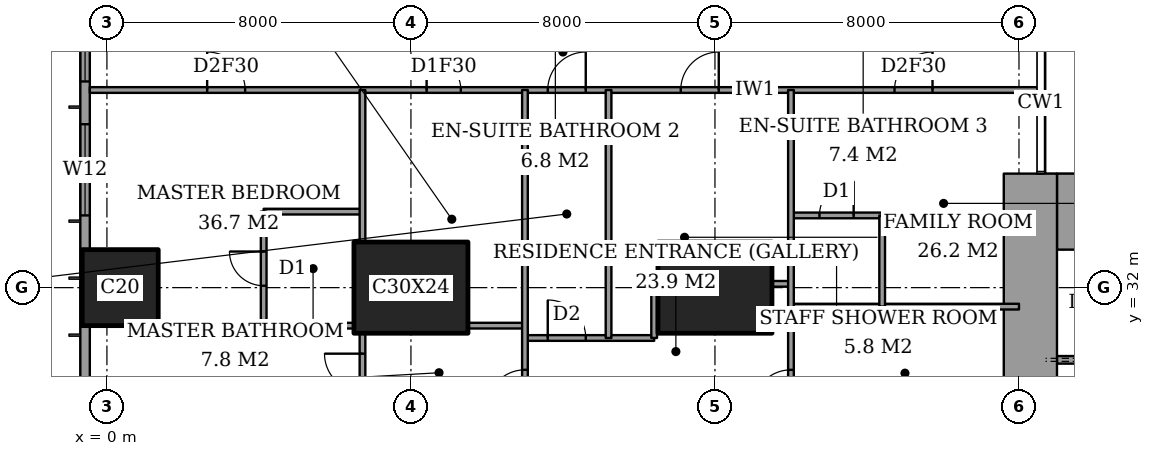
"""IFC4 building model, lengths in metres.
Left out: names, types, materials, properties, quantities, classifications, styles, units other than length and angle.
Written with IfcOpenShell. Run it as: python <this file> out.ifc"""

import sys

from ifc_helpers import new_model, si_unit, direction, frame, frame_2d, origin, origin_2d, place, context, subcontext, project, spatial, rectangle, extrude, element, fill, save


model = new_model("IFC4")
c1 = context("Model", 3, precision=1e-05, world=origin(), true_north=direction((0.0, 1.0)))
c2 = subcontext(c1, "Body", "Model", "MODEL_VIEW")
j1 = project(units=[si_unit("LENGTHUNIT", "METRE"), si_unit("PLANEANGLEUNIT", "RADIAN")], contexts=[c1])
p1 = place(None, origin())
s1 = spatial("IfcSite", under=j1, at=p1, CompositionType="ELEMENT")
p2 = place(p1, origin())
s2 = spatial("IfcBuilding", under=s1, at=p2, CompositionType="ELEMENT")
p3 = place(p2, frame((0.0, 0.0, 107.0)))
s3 = spatial("IfcBuildingStorey", under=s2, at=p3, CompositionType="ELEMENT", Elevation=107.0)
p4 = place(p3, frame((0.35, 32.0, 0.0), z_axis=(0.0, 0.0, 1.0), x_axis=(1.0, 0.0, 0.0)))
e1 = element("IfcColumn", 1, at=p4, inside=s3, PredefinedType="COLUMN", context=c2, shape_type="SweptSolid", body=[
    extrude(rectangle(XDim=2.0, YDim=2.0, at=origin_2d()), origin(), (0.0, 0.0, 1.0), 3.6),
])
for number, where, z_axis, x_axis in (
    (2, (8.0, 32.0, 0.0), (0.0, 0.0, 1.0), (1.0, 0.0, 0.0)),
    (3, (16.0, 32.0, 0.0), (0.0, 0.0, 1.0), (1.0, 0.0, 0.0)),
):
    element("IfcColumn", number, at=place(p3, frame(where, z_axis=z_axis, x_axis=x_axis)), inside=s3, PredefinedType="COLUMN", context=c2, shape_type="SweptSolid", body=[
        extrude(rectangle(XDim=3.0, YDim=2.4, at=origin_2d()), origin(), (0.0, 0.0, 1.0), 3.6),
    ])
p5 = place(p3, frame((25.0, 34.0, 0.0), z_axis=(0.0, 0.0, 1.0), x_axis=(1.0, 0.0, 0.0)))
e4 = element("IfcWall", 4, at=p5, inside=s3, PredefinedType="SHEAR", context=c2, shape_type="SweptSolid", body=[
    extrude(rectangle(XDim=3.15, YDim=2.0, at=frame_2d((1.575, 0.0))), origin(), (0.0, 0.0, 1.0), 3.6),
])
p6 = place(p3, frame((24.3, 23.15, 0.0), z_axis=(0.0, 0.0, 1.0), x_axis=(0.0, 1.0, 0.0)))
e5 = element("IfcWall", 5, at=p6, inside=s3, PredefinedType="SHEAR", context=c2, shape_type="SweptSolid", body=[
    extrude(rectangle(XDim=11.85, YDim=1.4, at=frame_2d((5.925, 0.0))), origin(), (0.0, 0.0, 1.0), 3.6),
])
p7 = place(p6, frame((0.75, 0.0, 0.0)))
e6 = element("IfcOpeningElement", 6, at=p7, cuts=e5, PredefinedType="OPENING", context=c2, shape_type="SweptSolid", body=[
    extrude(rectangle(XDim=1.8, YDim=2.4, at=frame_2d((0.9, 1.2))), frame((0.0, 0.71, 0.0), z_axis=(0.0, -1.0, 0.0), x_axis=(1.0, 0.0, 0.0)), (0.0, 0.0, 1.0), 1.42),
])
p8 = place(p3, frame((-0.575, 44.825, 0.0), z_axis=(0.0, 0.0, 1.0), x_axis=(0.0, -1.0, 0.0)))
e7 = element("IfcWall", 7, at=p8, inside=s3, PredefinedType="SOLIDWALL", context=c2, shape_type="SweptSolid", body=[
    extrude(rectangle(XDim=41.65, YDim=0.25, at=frame_2d((20.825, 0.0))), origin(), (0.0, 0.0, 1.0), 3.6),
])
p9 = place(p8, frame((0.775, 0.0, 0.4)))
e8 = element("IfcOpeningElement", 8, at=p9, cuts=e7, PredefinedType="OPENING", context=c2, shape_type="SweptSolid", body=[
    extrude(rectangle(XDim=2.4, YDim=2.2, at=frame_2d((1.2, 1.1))), frame((0.0, 0.135, 0.0), z_axis=(0.0, -1.0, 0.0), x_axis=(1.0, 0.0, 0.0)), (0.0, 0.0, 1.0), 0.27),
])
p10 = place(p8, frame((6.2, 0.0, 0.4)))
e9 = element("IfcOpeningElement", 9, at=p10, cuts=e7, PredefinedType="OPENING", context=c2, shape_type="SweptSolid", body=[
    extrude(rectangle(XDim=1.2, YDim=2.2, at=frame_2d((0.6, 1.1))), frame((0.0, 0.135, 0.0), z_axis=(0.0, -1.0, 0.0), x_axis=(1.0, 0.0, 0.0)), (0.0, 0.0, 1.0), 0.27),
])
p11 = place(p8, frame((8.525, 0.0, 0.4)))
e10 = element("IfcOpeningElement", 10, at=p11, cuts=e7, PredefinedType="OPENING", context=c2, shape_type="SweptSolid", body=[
    extrude(rectangle(XDim=2.4, YDim=2.2, at=frame_2d((1.2, 1.1))), frame((0.0, 0.135, 0.0), z_axis=(0.0, -1.0, 0.0), x_axis=(1.0, 0.0, 0.0)), (0.0, 0.0, 1.0), 0.27),
])
p12 = place(p8, frame((15.625, 0.0, 0.4)))
e11 = element("IfcOpeningElement", 11, at=p12, cuts=e7, PredefinedType="OPENING", context=c2, shape_type="SweptSolid", body=[
    extrude(rectangle(XDim=2.4, YDim=2.2, at=frame_2d((1.2, 1.1))), frame((0.0, 0.135, 0.0), z_axis=(0.0, -1.0, 0.0), x_axis=(1.0, 0.0, 0.0)), (0.0, 0.0, 1.0), 0.27),
])
p13 = place(p8, frame((23.625, 0.0, 0.4)))
e12 = element("IfcOpeningElement", 12, at=p13, cuts=e7, PredefinedType="OPENING", context=c2, shape_type="SweptSolid", body=[
    extrude(rectangle(XDim=2.4, YDim=2.2, at=frame_2d((1.2, 1.1))), frame((0.0, 0.135, 0.0), z_axis=(0.0, -1.0, 0.0), x_axis=(1.0, 0.0, 0.0)), (0.0, 0.0, 1.0), 0.27),
])
p14 = place(p8, frame((30.825, 0.0, 0.4)))
e13 = element("IfcOpeningElement", 13, at=p14, cuts=e7, PredefinedType="OPENING", context=c2, shape_type="SweptSolid", body=[
    extrude(rectangle(XDim=2.4, YDim=2.2, at=frame_2d((1.2, 1.1))), frame((0.0, 0.135, 0.0), z_axis=(0.0, -1.0, 0.0), x_axis=(1.0, 0.0, 0.0)), (0.0, 0.0, 1.0), 0.27),
])
p15 = place(p8, frame((34.5, 0.0, 0.4)))
e14 = element("IfcOpeningElement", 14, at=p15, cuts=e7, PredefinedType="OPENING", context=c2, shape_type="SweptSolid", body=[
    extrude(rectangle(XDim=1.2, YDim=2.2, at=frame_2d((0.6, 1.1))), frame((0.0, 0.135, 0.0), z_axis=(0.0, -1.0, 0.0), x_axis=(1.0, 0.0, 0.0)), (0.0, 0.0, 1.0), 0.27),
])
p16 = place(p8, frame((38.475, 0.0, 0.4)))
e15 = element("IfcOpeningElement", 15, at=p16, cuts=e7, PredefinedType="OPENING", context=c2, shape_type="SweptSolid", body=[
    extrude(rectangle(XDim=2.4, YDim=2.2, at=frame_2d((1.2, 1.1))), frame((0.0, 0.135, 0.0), z_axis=(0.0, -1.0, 0.0), x_axis=(1.0, 0.0, 0.0)), (0.0, 0.0, 1.0), 0.27),
])
p17 = place(p3, frame((11.0, 30.675, 0.0), z_axis=(0.0, 0.0, 1.0), x_axis=(1.0, 0.0, 0.0)))
e16 = element("IfcWall", 16, at=p17, inside=s3, PredefinedType="PARTITIONING", context=c2, shape_type="SweptSolid", body=[
    extrude(rectangle(XDim=3.4, YDim=0.15, at=frame_2d((1.7, 0.0))), origin(), (0.0, 0.0, 1.0), 3.35),
])
p18 = place(p17, frame((0.6, 0.0, 0.0)))
e17 = element("IfcOpeningElement", 17, at=p18, cuts=e16, PredefinedType="OPENING", context=c2, shape_type="SweptSolid", body=[
    extrude(rectangle(XDim=1.0, YDim=2.1, at=frame_2d((0.5, 1.05))), frame((0.0, 0.085, 0.0), z_axis=(0.0, -1.0, 0.0), x_axis=(1.0, 0.0, 0.0)), (0.0, 0.0, 1.0), 0.17),
])
p19 = place(p3, frame((1.35, 31.0, 0.0), z_axis=(0.0, 0.0, 1.0), x_axis=(1.0, 0.0, 0.0)))
e18 = element("IfcWall", 18, at=p19, inside=s3, PredefinedType="PARTITIONING", context=c2, shape_type="SweptSolid", body=[
    extrude(rectangle(XDim=5.15, YDim=0.15, at=frame_2d((2.575, 0.0))), origin(), (0.0, 0.0, 1.0), 3.35),
])
p20 = place(p3, frame((9.5, 31.0, 0.0), z_axis=(0.0, 0.0, 1.0), x_axis=(1.0, 0.0, 0.0)))
e19 = element("IfcWall", 19, at=p20, inside=s3, PredefinedType="PARTITIONING", context=c2, shape_type="SweptSolid", body=[
    extrude(rectangle(XDim=1.5, YDim=0.15, at=frame_2d((0.75, 0.0))), origin(), (0.0, 0.0, 1.0), 3.35),
])
p21 = place(p3, frame((18.0, 31.5, 0.0), z_axis=(0.0, 0.0, 1.0), x_axis=(1.0, 0.0, 0.0)))
e20 = element("IfcWall", 20, at=p21, inside=s3, PredefinedType="PARTITIONING", context=c2, shape_type="SweptSolid", body=[
    extrude(rectangle(XDim=6.0, YDim=0.15, at=frame_2d((3.0, 0.0))), origin(), (0.0, 0.0, 1.0), 3.35),
])
p22 = place(p3, frame((17.5, 32.1, 0.0), z_axis=(0.0, 0.0, 1.0), x_axis=(1.0, 0.0, 0.0)))
e21 = element("IfcWall", 21, at=p22, inside=s3, PredefinedType="PARTITIONING", context=c2, shape_type="SweptSolid", body=[
    extrude(rectangle(XDim=0.5, YDim=0.15, at=frame_2d((0.25, 0.0))), origin(), (0.0, 0.0, 1.0), 2.634),
])
p23 = place(p3, frame((18.0, 33.9, 0.0), z_axis=(0.0, 0.0, 1.0), x_axis=(1.0, 0.0, 0.0)))
e22 = element("IfcWall", 22, at=p23, inside=s3, PredefinedType="PARTITIONING", context=c2, shape_type="SweptSolid", body=[
    extrude(rectangle(XDim=2.4, YDim=0.15, at=frame_2d((1.2, 0.0))), origin(), (0.0, 0.0, 1.0), 3.35),
])
p24 = place(p23, frame((0.75, 0.0, 0.0)))
e23 = element("IfcOpeningElement", 23, at=p24, cuts=e22, PredefinedType="OPENING", context=c2, shape_type="SweptSolid", body=[
    extrude(rectangle(XDim=0.9, YDim=2.1, at=frame_2d((0.45, 1.05))), frame((0.0, 0.085, 0.0), z_axis=(0.0, -1.0, 0.0), x_axis=(1.0, 0.0, 0.0)), (0.0, 0.0, 1.0), 0.17),
])
p25 = place(p3, frame((4.125, 34.0, 0.0), z_axis=(0.0, 0.0, 1.0), x_axis=(1.0, 0.0, 0.0)))
e24 = element("IfcWall", 24, at=p25, inside=s3, PredefinedType="PARTITIONING", context=c2, shape_type="SweptSolid", body=[
    extrude(rectangle(XDim=2.6, YDim=0.15, at=frame_2d((1.3, 0.0))), origin(), (0.0, 0.0, 1.0), 3.35),
])
p26 = place(p3, frame((-0.45, 37.2, 0.0), z_axis=(0.0, 0.0, 1.0), x_axis=(1.0, 0.0, 0.0)))
e25 = element("IfcWall", 25, at=p26, inside=s3, PredefinedType="PARTITIONING", context=c2, shape_type="SweptSolid", body=[
    extrude(rectangle(XDim=25.011, YDim=0.15, at=frame_2d((12.505, 0.0))), origin(), (0.0, 0.0, 1.0), 3.35),
])
p27 = place(p26, frame((12.05, 0.0, 0.0)))
e26 = element("IfcOpeningElement", 26, at=p27, cuts=e25, PredefinedType="OPENING", context=c2, shape_type="SweptSolid", body=[
    extrude(rectangle(XDim=1.0, YDim=2.1, at=frame_2d((0.5, 1.05))), frame((0.0, 0.085, 0.0), z_axis=(0.0, -1.0, 0.0), x_axis=(1.0, 0.0, 0.0)), (0.0, 0.0, 1.0), 0.17),
])
p28 = place(p26, frame((3.087, 0.0, 0.0)))
e27 = element("IfcOpeningElement", 27, at=p28, cuts=e25, PredefinedType="OPENING", context=c2, shape_type="SweptSolid", body=[
    extrude(rectangle(XDim=1.0, YDim=2.1, at=frame_2d((0.5, 1.05))), frame((0.0, 0.085, 0.0), z_axis=(0.0, -1.0, 0.0), x_axis=(1.0, 0.0, 0.0)), (0.0, 0.0, 1.0), 0.17),
])
p29 = place(p26, frame((8.863, 0.0, 0.0)))
e28 = element("IfcOpeningElement", 28, at=p29, cuts=e25, PredefinedType="OPENING", context=c2, shape_type="SweptSolid", body=[
    extrude(rectangle(XDim=0.9, YDim=2.1, at=frame_2d((0.45, 1.05))), frame((0.0, 0.085, 0.0), z_axis=(0.0, -1.0, 0.0), x_axis=(1.0, 0.0, 0.0)), (0.0, 0.0, 1.0), 0.17),
])
p30 = place(p26, frame((15.55, 0.0, 0.0)))
e29 = element("IfcOpeningElement", 29, at=p30, cuts=e25, PredefinedType="OPENING", context=c2, shape_type="SweptSolid", body=[
    extrude(rectangle(XDim=1.0, YDim=2.1, at=frame_2d((0.5, 1.05))), frame((0.0, 0.085, 0.0), z_axis=(0.0, -1.0, 0.0), x_axis=(1.0, 0.0, 0.0)), (0.0, 0.0, 1.0), 0.17),
])
p31 = place(p26, frame((21.175, 0.0, 0.0)))
e30 = element("IfcOpeningElement", 30, at=p31, cuts=e25, PredefinedType="OPENING", context=c2, shape_type="SweptSolid", body=[
    extrude(rectangle(XDim=1.0, YDim=2.1, at=frame_2d((0.5, 1.05))), frame((0.0, 0.085, 0.0), z_axis=(0.0, -1.0, 0.0), x_axis=(1.0, 0.0, 0.0)), (0.0, 0.0, 1.0), 0.17),
])
p32 = place(p3, frame((4.125, 31.0, 0.0), z_axis=(0.0, 0.0, 1.0), x_axis=(0.0, 1.0, 0.0)))
e31 = element("IfcWall", 31, at=p32, inside=s3, PredefinedType="PARTITIONING", context=c2, shape_type="SweptSolid", body=[
    extrude(rectangle(XDim=3.0, YDim=0.15, at=frame_2d((1.5, 0.0))), origin(), (0.0, 0.0, 1.0), 3.35),
])
p33 = place(p32, frame((1.05, 0.0, 0.0)))
e32 = element("IfcOpeningElement", 32, at=p33, cuts=e31, PredefinedType="OPENING", context=c2, shape_type="SweptSolid", body=[
    extrude(rectangle(XDim=0.9, YDim=2.1, at=frame_2d((0.45, 1.05))), frame((0.0, 0.085, 0.0), z_axis=(0.0, -1.0, 0.0), x_axis=(1.0, 0.0, 0.0)), (0.0, 0.0, 1.0), 0.17),
])
p34 = place(p3, frame((6.725, 28.35, 0.0), z_axis=(0.0, 0.0, 1.0), x_axis=(0.0, 1.0, 0.0)))
e33 = element("IfcWall", 33, at=p34, inside=s3, PredefinedType="PARTITIONING", context=c2, shape_type="SweptSolid", body=[
    extrude(rectangle(XDim=2.45, YDim=0.15, at=frame_2d((1.225, 0.0))), origin(), (0.0, 0.0, 1.0), 3.35),
])
p35 = place(p34, frame((0.913, 0.0, 0.0)))
e34 = element("IfcOpeningElement", 34, at=p35, cuts=e33, PredefinedType="OPENING", context=c2, shape_type="SweptSolid", body=[
    extrude(rectangle(XDim=1.0, YDim=2.1, at=frame_2d((0.5, 1.05))), frame((0.0, 0.085, 0.0), z_axis=(0.0, -1.0, 0.0), x_axis=(1.0, 0.0, 0.0)), (0.0, 0.0, 1.0), 0.17),
])
p36 = place(p3, frame((6.725, 33.2, 0.0), z_axis=(0.0, 0.0, 1.0), x_axis=(0.0, 1.0, 0.0)))
e35 = element("IfcWall", 35, at=p36, inside=s3, PredefinedType="PARTITIONING", context=c2, shape_type="SweptSolid", body=[
    extrude(rectangle(XDim=4.0, YDim=0.15, at=frame_2d((2.0, 0.0))), origin(), (0.0, 0.0, 1.0), 3.35),
])
p37 = place(p3, frame((11.0, 28.0, 0.0), z_axis=(0.0, 0.0, 1.0), x_axis=(0.0, 1.0, 0.0)))
e36 = element("IfcWall", 36, at=p37, inside=s3, PredefinedType="PARTITIONING", context=c2, shape_type="SweptSolid", body=[
    extrude(rectangle(XDim=9.2, YDim=0.15, at=frame_2d((4.6, 0.0))), origin(), (0.0, 0.0, 1.0), 3.35),
])
p38 = place(p37, frame((0.837, 0.0, 0.0)))
e37 = element("IfcOpeningElement", 37, at=p38, cuts=e36, PredefinedType="OPENING", context=c2, shape_type="SweptSolid", body=[
    extrude(rectangle(XDim=1.0, YDim=2.1, at=frame_2d((0.5, 1.05))), frame((0.0, 0.085, 0.0), z_axis=(0.0, -1.0, 0.0), x_axis=(1.0, 0.0, 0.0)), (0.0, 0.0, 1.0), 0.17),
])
p39 = place(p3, frame((13.2, 30.675, 0.0), z_axis=(0.0, 0.0, 1.0), x_axis=(0.0, 1.0, 0.0)))
e38 = element("IfcWall", 38, at=p39, inside=s3, PredefinedType="PARTITIONING", context=c2, shape_type="SweptSolid", body=[
    extrude(rectangle(XDim=6.525, YDim=0.15, at=frame_2d((3.262, 0.0))), origin(), (0.0, 0.0, 1.0), 3.35),
])
p40 = place(p3, frame((14.4, 30.675, 0.0), z_axis=(0.0, 0.0, 1.0), x_axis=(0.0, 1.0, 0.0)))
e39 = element("IfcWall", 39, at=p40, inside=s3, PredefinedType="PARTITIONING", context=c2, shape_type="SweptSolid", body=[
    extrude(rectangle(XDim=1.425, YDim=0.15, at=frame_2d((0.712, 0.0))), origin(), (0.0, 0.0, 1.0), 3.35),
])
p41 = place(p3, frame((18.0, 28.0, 0.0), z_axis=(0.0, 0.0, 1.0), x_axis=(0.0, 1.0, 0.0)))
e40 = element("IfcWall", 40, at=p41, inside=s3, PredefinedType="PARTITIONING", context=c2, shape_type="SweptSolid", body=[
    extrude(rectangle(XDim=9.2, YDim=0.15, at=frame_2d((4.6, 0.0))), origin(), (0.0, 0.0, 1.0), 3.35),
])
p42 = place(p41, frame((0.837, 0.0, 0.0)))
e41 = element("IfcOpeningElement", 41, at=p42, cuts=e40, PredefinedType="OPENING", context=c2, shape_type="SweptSolid", body=[
    extrude(rectangle(XDim=1.0, YDim=2.1, at=frame_2d((0.5, 1.05))), frame((0.0, 0.085, 0.0), z_axis=(0.0, -1.0, 0.0), x_axis=(1.0, 0.0, 0.0)), (0.0, 0.0, 1.0), 0.17),
])
p43 = place(p3, frame((20.4, 31.5, 0.0), z_axis=(0.0, 0.0, 1.0), x_axis=(0.0, 1.0, 0.0)))
e42 = element("IfcWall", 42, at=p43, inside=s3, PredefinedType="PARTITIONING", context=c2, shape_type="SweptSolid", body=[
    extrude(rectangle(XDim=2.4, YDim=0.15, at=frame_2d((1.2, 0.0))), origin(), (0.0, 0.0, 1.0), 3.35),
])
p44 = place(p3, frame((25.0, 30.1, 0.0), z_axis=(0.0, 0.0, 1.0), x_axis=(1.0, 0.0, 0.0)))
e43 = element("IfcWall", 43, at=p44, inside=s3, PredefinedType="PARTITIONING", context=c2, shape_type="SweptSolid", body=[
    extrude(rectangle(XDim=12.7, YDim=0.2, at=frame_2d((6.35, 0.0))), origin(), (0.0, 0.0, 1.0), 3.6),
])
p45 = place(p44, frame((0.9, 0.0, 0.0)))
e44 = element("IfcOpeningElement", 44, at=p45, cuts=e43, PredefinedType="OPENING", context=c2, shape_type="SweptSolid", body=[
    extrude(rectangle(XDim=1.2, YDim=2.1, at=frame_2d((0.6, 1.05))), frame((0.0, 0.11, 0.0), z_axis=(0.0, -1.0, 0.0), x_axis=(1.0, 0.0, 0.0)), (0.0, 0.0, 1.0), 0.22),
])
p46 = place(p10, origin())
e45 = element("IfcWindow", 45, at=p46, inside=s3, PartitioningType="SINGLE_PANEL", PredefinedType="WINDOW", context=c2, shape_type="SweptSolid", body=[
    extrude(rectangle(XDim=1.2, YDim=2.2, at=frame_2d((0.6, 1.1))), frame((0.0, 0.03, 0.0), z_axis=(0.0, -1.0, 0.0), x_axis=(1.0, 0.0, 0.0)), (0.0, 0.0, 1.0), 0.06),
])
fill(e9, e45)
p47 = place(p11, origin())
e46 = element("IfcWindow", 46, at=p47, inside=s3, PartitioningType="SINGLE_PANEL", PredefinedType="WINDOW", context=c2, shape_type="SweptSolid", body=[
    extrude(rectangle(XDim=2.4, YDim=2.2, at=frame_2d((1.2, 1.1))), frame((0.0, 0.03, 0.0), z_axis=(0.0, -1.0, 0.0), x_axis=(1.0, 0.0, 0.0)), (0.0, 0.0, 1.0), 0.06),
])
fill(e10, e46)
p48 = place(p27, origin())
e47 = element("IfcDoor", 47, at=p48, inside=s3, OperationType="SINGLE_SWING_LEFT", PredefinedType="DOOR", context=c2, shape_type="SweptSolid", body=[
    extrude(rectangle(XDim=1.0, YDim=2.1, at=frame_2d((0.5, 1.05))), frame((0.0, 0.025, 0.0), z_axis=(0.0, -1.0, 0.0), x_axis=(1.0, 0.0, 0.0)), (0.0, 0.0, 1.0), 0.05),
])
fill(e26, e47)
p49 = place(p33, origin())
e48 = element("IfcDoor", 48, at=p49, inside=s3, OperationType="SINGLE_SWING_LEFT", PredefinedType="DOOR", context=c2, shape_type="SweptSolid", body=[
    extrude(rectangle(XDim=0.9, YDim=2.1, at=frame_2d((0.45, 1.05))), frame((0.0, 0.025, 0.0), z_axis=(0.0, -1.0, 0.0), x_axis=(1.0, 0.0, 0.0)), (0.0, 0.0, 1.0), 0.05),
])
fill(e32, e48)
p50 = place(p28, origin())
e49 = element("IfcDoor", 49, at=p50, inside=s3, OperationType="SINGLE_SWING_RIGHT", PredefinedType="DOOR", context=c2, shape_type="SweptSolid", body=[
    extrude(rectangle(XDim=1.0, YDim=2.1, at=frame_2d((0.5, 1.05))), frame((0.0, 0.025, 0.0), z_axis=(0.0, -1.0, 0.0), x_axis=(1.0, 0.0, 0.0)), (0.0, 0.0, 1.0), 0.05),
])
fill(e27, e49)
p51 = place(p35, origin())
e50 = element("IfcDoor", 50, at=p51, inside=s3, OperationType="SINGLE_SWING_LEFT", PredefinedType="DOOR", context=c2, shape_type="SweptSolid", body=[
    extrude(rectangle(XDim=1.0, YDim=2.1, at=frame_2d((0.5, 1.05))), frame((0.0, 0.025, 0.0), z_axis=(0.0, -1.0, 0.0), x_axis=(1.0, 0.0, 0.0)), (0.0, 0.0, 1.0), 0.05),
])
fill(e34, e50)
p52 = place(p29, origin())
e51 = element("IfcDoor", 51, at=p52, inside=s3, OperationType="SINGLE_SWING_RIGHT", PredefinedType="DOOR", context=c2, shape_type="SweptSolid", body=[
    extrude(rectangle(XDim=0.9, YDim=2.1, at=frame_2d((0.45, 1.05))), frame((0.0, 0.025, 0.0), z_axis=(0.0, -1.0, 0.0), x_axis=(1.0, 0.0, 0.0)), (0.0, 0.0, 1.0), 0.05),
])
fill(e28, e51)
p53 = place(p38, origin())
e52 = element("IfcDoor", 52, at=p53, inside=s3, OperationType="SINGLE_SWING_RIGHT", PredefinedType="DOOR", context=c2, shape_type="SweptSolid", body=[
    extrude(rectangle(XDim=1.0, YDim=2.1, at=frame_2d((0.5, 1.05))), frame((0.0, 0.025, 0.0), z_axis=(0.0, -1.0, 0.0), x_axis=(1.0, 0.0, 0.0)), (0.0, 0.0, 1.0), 0.05),
])
fill(e37, e52)
p54 = place(p18, origin())
e53 = element("IfcDoor", 53, at=p54, inside=s3, OperationType="SINGLE_SWING_RIGHT", PredefinedType="DOOR", context=c2, shape_type="SweptSolid", body=[
    extrude(rectangle(XDim=1.0, YDim=2.1, at=frame_2d((0.5, 1.05))), frame((0.0, 0.025, 0.0), z_axis=(0.0, -1.0, 0.0), x_axis=(1.0, 0.0, 0.0)), (0.0, 0.0, 1.0), 0.05),
])
fill(e17, e53)
p55 = place(p30, origin())
e54 = element("IfcDoor", 54, at=p55, inside=s3, OperationType="SINGLE_SWING_LEFT", PredefinedType="DOOR", context=c2, shape_type="SweptSolid", body=[
    extrude(rectangle(XDim=1.0, YDim=2.1, at=frame_2d((0.5, 1.05))), frame((0.0, 0.025, 0.0), z_axis=(0.0, -1.0, 0.0), x_axis=(1.0, 0.0, 0.0)), (0.0, 0.0, 1.0), 0.05),
])
fill(e29, e54)
p56 = place(p24, origin())
e55 = element("IfcDoor", 55, at=p56, inside=s3, OperationType="SINGLE_SWING_LEFT", PredefinedType="DOOR", context=c2, shape_type="SweptSolid", body=[
    extrude(rectangle(XDim=0.9, YDim=2.1, at=frame_2d((0.45, 1.05))), frame((0.0, 0.025, 0.0), z_axis=(0.0, -1.0, 0.0), x_axis=(1.0, 0.0, 0.0)), (0.0, 0.0, 1.0), 0.05),
])
fill(e23, e55)
p57 = place(p31, origin())
e56 = element("IfcDoor", 56, at=p57, inside=s3, OperationType="SINGLE_SWING_LEFT", PredefinedType="DOOR", context=c2, shape_type="SweptSolid", body=[
    extrude(rectangle(XDim=1.0, YDim=2.1, at=frame_2d((0.5, 1.05))), frame((0.0, 0.025, 0.0), z_axis=(0.0, -1.0, 0.0), x_axis=(1.0, 0.0, 0.0)), (0.0, 0.0, 1.0), 0.05),
])
fill(e30, e56)
p58 = place(p42, origin())
e57 = element("IfcDoor", 57, at=p58, inside=s3, OperationType="SINGLE_SWING_RIGHT", PredefinedType="DOOR", context=c2, shape_type="SweptSolid", body=[
    extrude(rectangle(XDim=1.0, YDim=2.1, at=frame_2d((0.5, 1.05))), frame((0.0, 0.025, 0.0), z_axis=(0.0, -1.0, 0.0), x_axis=(1.0, 0.0, 0.0)), (0.0, 0.0, 1.0), 0.05),
])
fill(e41, e57)
save(model, sys.argv[1])
